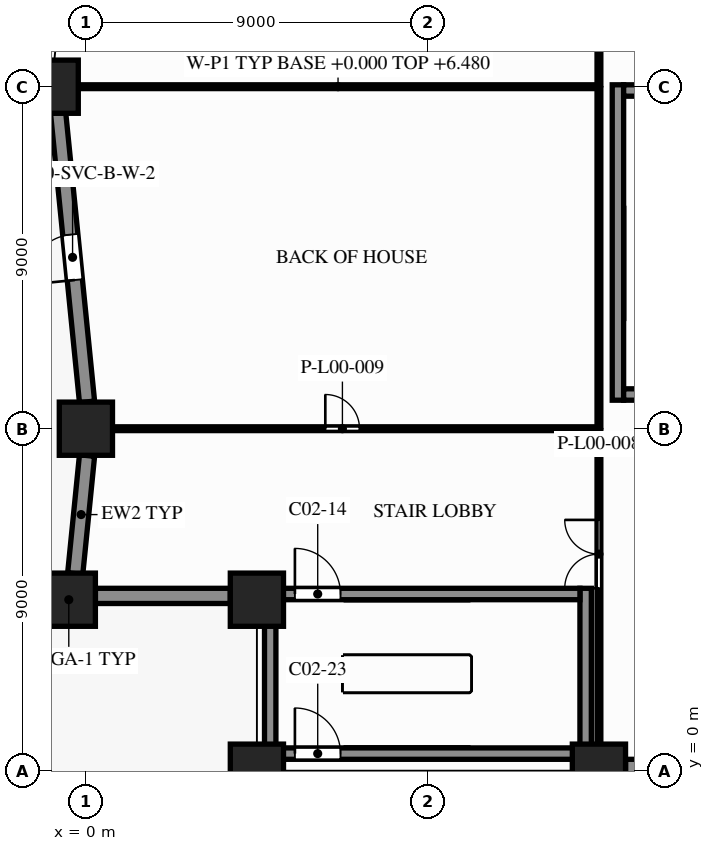
"""IFC4 building model, lengths in metres.
Left out: names, types, materials, properties, quantities, classifications, styles, units other than length and angle.
Written with IfcOpenShell. Run it as: python <this file> out.ifc"""

import sys

from ifc_helpers import new_model, si_unit, direction, frame, frame_2d, origin, origin_2d, place, context, subcontext, project, spatial, rectangle, extrude, element, fill, save


model = new_model("IFC4")
c1 = context("Model", 3, precision=1e-05, world=origin(), true_north=direction((0.0, 1.0)))
c2 = subcontext(c1, "Body", "Model", "MODEL_VIEW")
j1 = project(units=[si_unit("LENGTHUNIT", "METRE"), si_unit("PLANEANGLEUNIT", "RADIAN")], contexts=[c1])
p1 = place(None, origin())
s1 = spatial("IfcSite", under=j1, at=p1, CompositionType="ELEMENT")
p2 = place(p1, origin())
s2 = spatial("IfcBuilding", under=s1, at=p2, CompositionType="ELEMENT")
p3 = place(p2, origin())
s3 = spatial("IfcBuildingStorey", under=s2, at=p3, CompositionType="ELEMENT", Elevation=0.0)
for number, where, z_axis, x_axis in (
    (1, (4.5, 0.0, 0.0), (0.0, 0.0, 1.0), (1.0, 0.0, 0.0)),
    (2, (13.5, 0.0, 0.0), (0.0, 0.0, 1.0), (1.0, 0.0, 0.0)),
    (3, (-0.9, 18.0, 0.0), (0.0, 0.0, 1.0), (1.0, 0.0, 0.0)),
    (4, (0.0, 9.0, 0.0), (0.0, 0.0, 1.0), (1.0, 0.0, 0.0)),
    (5, (-0.45, 4.5, 0.0), (0.0, 0.0, 1.0), (1.0, 0.0, 0.0)),
    (6, (4.5, 4.5, 0.0), (0.0, 0.0, 1.0), (1.0, 0.0, 0.0)),
):
    element("IfcColumn", number, at=place(p3, frame(where, z_axis=z_axis, x_axis=x_axis)), inside=s3, PredefinedType="COLUMN", context=c2, shape_type="SweptSolid", body=[
        extrude(rectangle(XDim=1.4, YDim=1.4, at=origin_2d()), origin(), (0.0, 0.0, 1.0), 7.5),
    ])
p4 = place(p3, frame((21.8, 0.1, 0.0), z_axis=(0.0, 0.0, 1.0), x_axis=(-1.0, 0.0, 0.0)))
e7 = element("IfcWall", 7, at=p4, inside=s3, PredefinedType="SOLIDWALL", context=c2, shape_type="SweptSolid", body=[
    extrude(rectangle(XDim=7.6, YDim=0.4, at=frame_2d((3.8, 0.0))), origin(), (0.0, 0.0, 1.0), 6.6),
])
p5 = place(p4, frame((2.3, 0.0, 0.0)))
e8 = element("IfcOpeningElement", 8, at=p5, cuts=e7, PredefinedType="OPENING", context=c2, shape_type="SweptSolid", body=[
    extrude(rectangle(XDim=3.0, YDim=3.0, at=frame_2d((1.5, 1.5))), frame((0.0, 0.21, 0.0), z_axis=(0.0, -1.0, 0.0), x_axis=(1.0, 0.0, 0.0)), (0.0, 0.0, 1.0), 0.42),
])
p6 = place(p3, frame((0.03, 9.707, 0.0), z_axis=(0.0, 0.0, 1.0), x_axis=(-0.099478423711, 0.995039719416, 0.0)))
e9 = element("IfcWall", 9, at=p6, inside=s3, PredefinedType="SOLIDWALL", context=c2, shape_type="SweptSolid", body=[
    extrude(rectangle(XDim=7.645, YDim=0.4, at=frame_2d((3.822, 0.0))), origin(), (0.0, 0.0, 1.0), 6.6),
])
p7 = place(p6, frame((3.222, 0.0, 0.0)))
e10 = element("IfcOpeningElement", 10, at=p7, cuts=e9, PredefinedType="OPENING", context=c2, shape_type="SweptSolid", body=[
    extrude(rectangle(XDim=1.2, YDim=2.4, at=frame_2d((0.6, 1.2))), frame((0.0, 0.21, 0.0), z_axis=(0.0, -1.0, 0.0), x_axis=(1.0, 0.0, 0.0)), (0.0, 0.0, 1.0), 0.42),
])
p8 = place(p3, frame((-0.281, 5.187, 0.0), z_axis=(0.0, 0.0, 1.0), x_axis=(0.099457269599, 0.995041834057, 0.0)))
e11 = element("IfcWall", 11, at=p8, inside=s3, PredefinedType="SOLIDWALL", context=c2, shape_type="SweptSolid", body=[
    extrude(rectangle(XDim=3.122, YDim=0.4, at=frame_2d((1.561, 0.0))), origin(), (0.0, 0.0, 1.0), 6.6),
])
p9 = place(p3, frame((3.8, 4.6, 0.0), z_axis=(0.0, 0.0, 1.0), x_axis=(-1.0, 0.0, 0.0)))
e12 = element("IfcWall", 12, at=p9, inside=s3, PredefinedType="SOLIDWALL", context=c2, shape_type="SweptSolid", body=[
    extrude(rectangle(XDim=3.55, YDim=0.4, at=frame_2d((1.775, 0.0))), origin(), (0.0, 0.0, 1.0), 6.6),
])
p10 = place(p3, frame((5.0, 0.45, 0.0), z_axis=(0.0, 0.0, 1.0), x_axis=(1.0, 0.0, 0.0)))
e13 = element("IfcWall", 13, at=p10, inside=s3, PredefinedType="SHEAR", context=c2, shape_type="SweptSolid", body=[
    extrude(rectangle(XDim=8.0, YDim=0.3, at=frame_2d((4.0, 0.0))), origin(), (0.0, 0.0, 1.0), 7.2),
])
p11 = place(p10, frame((0.5, 0.0, 0.0)))
e14 = element("IfcOpeningElement", 14, at=p11, cuts=e13, PredefinedType="OPENING", context=c2, shape_type="SweptSolid", body=[
    extrude(rectangle(XDim=1.2, YDim=2.2, at=frame_2d((0.6, 1.1))), frame((0.0, 0.16, 0.0), z_axis=(0.0, -1.0, 0.0), x_axis=(1.0, 0.0, 0.0)), (0.0, 0.0, 1.0), 0.32),
])
p12 = place(p3, frame((5.0, 4.65, 0.0), z_axis=(0.0, 0.0, 1.0), x_axis=(1.0, 0.0, 0.0)))
e15 = element("IfcWall", 15, at=p12, inside=s3, PredefinedType="SHEAR", context=c2, shape_type="SweptSolid", body=[
    extrude(rectangle(XDim=8.0, YDim=0.3, at=frame_2d((4.0, 0.0))), origin(), (0.0, 0.0, 1.0), 7.2),
])
p13 = place(p12, frame((0.5, 0.0, 0.0)))
e16 = element("IfcOpeningElement", 16, at=p13, cuts=e15, PredefinedType="OPENING", context=c2, shape_type="SweptSolid", body=[
    extrude(rectangle(XDim=1.2, YDim=2.2, at=frame_2d((0.6, 1.1))), frame((0.0, 0.16, 0.0), z_axis=(0.0, -1.0, 0.0), x_axis=(1.0, 0.0, 0.0)), (0.0, 0.0, 1.0), 0.32),
])
for number, where, z_axis, x_axis in (
    (17, (14.15, 9.9, 0.0), (0.0, 0.0, 1.0), (1.0, 0.0, 0.0)),
    (18, (14.15, 17.9, 0.0), (0.0, 0.0, 1.0), (1.0, 0.0, 0.0)),
):
    element("IfcWall", number, at=place(p3, frame(where, z_axis=z_axis, x_axis=x_axis)), inside=s3, PredefinedType="SHEAR", context=c2, shape_type="SweptSolid", body=[
        extrude(rectangle(XDim=3.3, YDim=0.3, at=frame_2d((1.65, 0.0))), origin(), (0.0, 0.0, 1.0), 7.2),
    ])
for number, where, z_axis, x_axis in (
    (19, (4.85, 0.3, 0.0), (0.0, 0.0, 1.0), (0.0, 1.0, 0.0)),
    (20, (13.15, 0.3, 0.0), (0.0, 0.0, 1.0), (0.0, 1.0, 0.0)),
):
    element("IfcWall", number, at=place(p3, frame(where, z_axis=z_axis, x_axis=x_axis)), inside=s3, PredefinedType="SHEAR", context=c2, shape_type="SweptSolid", body=[
        extrude(rectangle(XDim=4.5, YDim=0.3, at=frame_2d((2.25, 0.0))), origin(), (0.0, 0.0, 1.0), 7.2),
    ])
p14 = place(p3, frame((14.0, 9.75, 0.0), z_axis=(0.0, 0.0, 1.0), x_axis=(0.0, 1.0, 0.0)))
e21 = element("IfcWall", 21, at=p14, inside=s3, PredefinedType="SHEAR", context=c2, shape_type="SweptSolid", body=[
    extrude(rectangle(XDim=8.3, YDim=0.3, at=frame_2d((4.15, 0.0))), origin(), (0.0, 0.0, 1.0), 7.2),
])
p15 = place(p3, frame((13.5, 0.72, 0.0), z_axis=(0.0, 0.0, 1.0), x_axis=(0.0, 1.0, 0.0)))
e22 = element("IfcWall", 22, at=p15, inside=s3, PredefinedType="PARTITIONING", context=c2, shape_type="SweptSolid", body=[
    extrude(rectangle(XDim=8.23, YDim=0.1, at=frame_2d((4.115, 0.0))), origin(), (0.0, 0.0, 1.0), 6.48),
])
p16 = place(p15, frame((4.08, 0.0, 0.0)))
e23 = element("IfcOpeningElement", 23, at=p16, cuts=e22, PredefinedType="OPENING", context=c2, shape_type="SweptSolid", body=[
    extrude(rectangle(XDim=1.8, YDim=2.1, at=frame_2d((0.9, 1.05))), frame((0.0, 0.06, 0.0), z_axis=(0.0, -1.0, 0.0), x_axis=(1.0, 0.0, 0.0)), (0.0, 0.0, 1.0), 0.12),
])
p17 = place(p3, frame((0.72, 9.0, 0.0), z_axis=(0.0, 0.0, 1.0), x_axis=(1.0, 0.0, 0.0)))
e24 = element("IfcWall", 24, at=p17, inside=s3, PredefinedType="PARTITIONING", context=c2, shape_type="SweptSolid", body=[
    extrude(rectangle(XDim=12.73, YDim=0.1, at=frame_2d((6.365, 0.0))), origin(), (0.0, 0.0, 1.0), 6.48),
])
p18 = place(p17, frame((5.58, 0.0, 0.0)))
e25 = element("IfcOpeningElement", 25, at=p18, cuts=e24, PredefinedType="OPENING", context=c2, shape_type="SweptSolid", body=[
    extrude(rectangle(XDim=0.9, YDim=2.1, at=frame_2d((0.45, 1.05))), frame((0.0, 0.06, 0.0), z_axis=(0.0, -1.0, 0.0), x_axis=(1.0, 0.0, 0.0)), (0.0, 0.0, 1.0), 0.12),
])
p19 = place(p3, frame((13.5, 9.05, 0.0), z_axis=(0.0, 0.0, 1.0), x_axis=(0.0, 1.0, 0.0)))
e26 = element("IfcWall", 26, at=p19, inside=s3, PredefinedType="PARTITIONING", context=c2, shape_type="SweptSolid", body=[
    extrude(rectangle(XDim=8.9, YDim=0.1, at=frame_2d((4.45, 0.0))), origin(), (0.0, 0.0, 1.0), 6.48),
])
p20 = place(p3, frame((-0.18, 18.0, 0.0), z_axis=(0.0, 0.0, 1.0), x_axis=(1.0, 0.0, 0.0)))
e27 = element("IfcWall", 27, at=p20, inside=s3, PredefinedType="PARTITIONING", context=c2, shape_type="SweptSolid", body=[
    extrude(rectangle(XDim=13.63, YDim=0.1, at=frame_2d((6.815, 0.0))), origin(), (0.0, 0.0, 1.0), 6.48),
])
p21 = place(p3, frame((13.5, 18.05, 0.0), z_axis=(0.0, 0.0, 1.0), x_axis=(0.0, 1.0, 0.0)))
e28 = element("IfcWall", 28, at=p21, inside=s3, PredefinedType="PARTITIONING", context=c2, shape_type="SweptSolid", body=[
    extrude(rectangle(XDim=8.9, YDim=0.1, at=frame_2d((4.45, 0.0))), origin(), (0.0, 0.0, 1.0), 6.48),
])
p22 = place(p21, frame((3.55, 0.0, 0.0)))
e29 = element("IfcOpeningElement", 29, at=p22, cuts=e28, PredefinedType="OPENING", context=c2, shape_type="SweptSolid", body=[
    extrude(rectangle(XDim=1.8, YDim=2.1, at=frame_2d((0.9, 1.05))), frame((0.0, 0.06, 0.0), z_axis=(0.0, -1.0, 0.0), x_axis=(1.0, 0.0, 0.0)), (0.0, 0.0, 1.0), 0.12),
])
p23 = place(p7, origin())
e30 = element("IfcDoor", 30, at=p23, inside=s3, OperationType="SINGLE_SWING_RIGHT", PredefinedType="DOOR", context=c2, shape_type="SweptSolid", body=[
    extrude(rectangle(XDim=1.2, YDim=2.4, at=frame_2d((0.6, 1.2))), frame((0.0, 0.025, 0.0), z_axis=(0.0, -1.0, 0.0), x_axis=(1.0, 0.0, 0.0)), (0.0, 0.0, 1.0), 0.05),
])
fill(e10, e30)
p24 = place(p13, origin())
e31 = element("IfcDoor", 31, at=p24, inside=s3, OperationType="SINGLE_SWING_LEFT", PredefinedType="DOOR", context=c2, shape_type="SweptSolid", body=[
    extrude(rectangle(XDim=1.2, YDim=2.2, at=frame_2d((0.6, 1.1))), frame((0.0, 0.025, 0.0), z_axis=(0.0, -1.0, 0.0), x_axis=(1.0, 0.0, 0.0)), (0.0, 0.0, 1.0), 0.05),
])
fill(e16, e31)
p25 = place(p11, origin())
e32 = element("IfcDoor", 32, at=p25, inside=s3, OperationType="SINGLE_SWING_RIGHT", PredefinedType="DOOR", context=c2, shape_type="SweptSolid", body=[
    extrude(rectangle(XDim=1.2, YDim=2.2, at=frame_2d((0.6, 1.1))), frame((0.0, 0.025, 0.0), z_axis=(0.0, -1.0, 0.0), x_axis=(1.0, 0.0, 0.0)), (0.0, 0.0, 1.0), 0.05),
])
fill(e14, e32)
p26 = place(p16, origin())
e33 = element("IfcDoor", 33, at=p26, inside=s3, OperationType="DOUBLE_DOOR_SINGLE_SWING", PredefinedType="DOOR", context=c2, shape_type="SweptSolid", body=[
    extrude(rectangle(XDim=1.8, YDim=2.1, at=frame_2d((0.9, 1.05))), frame((0.0, 0.025, 0.0), z_axis=(0.0, -1.0, 0.0), x_axis=(1.0, 0.0, 0.0)), (0.0, 0.0, 1.0), 0.05),
])
fill(e23, e33)
p27 = place(p18, origin())
e34 = element("IfcDoor", 34, at=p27, inside=s3, OperationType="SINGLE_SWING_LEFT", PredefinedType="DOOR", context=c2, shape_type="SweptSolid", body=[
    extrude(rectangle(XDim=0.9, YDim=2.1, at=frame_2d((0.45, 1.05))), frame((0.0, 0.025, 0.0), z_axis=(0.0, -1.0, 0.0), x_axis=(1.0, 0.0, 0.0)), (0.0, 0.0, 1.0), 0.05),
])
fill(e25, e34)
save(model, sys.argv[1])
